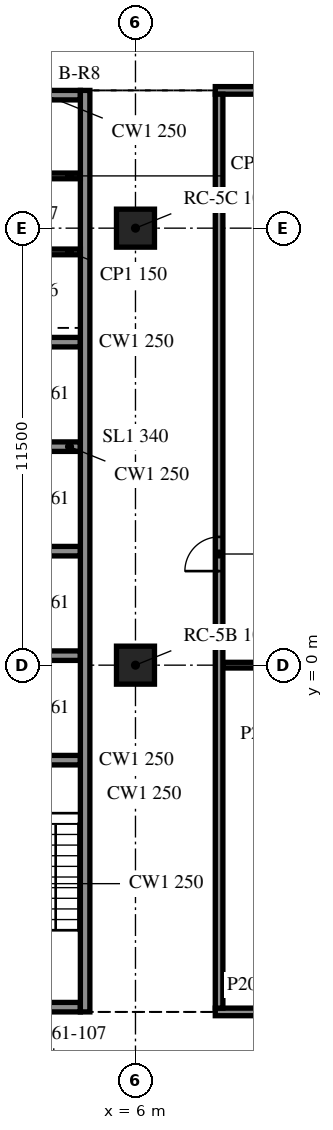
"""IFC4 building model, lengths in metres.
Left out: names, types, materials, properties, quantities, classifications, styles, units other than length and angle.
Written with IfcOpenShell. Run it as: python <this file> out.ifc"""

import sys

from ifc_helpers import new_model, si_unit, direction, frame, frame_2d, origin, origin_2d, place, context, subcontext, project, spatial, rectangle, extrude, element, fill, save


model = new_model("IFC4")
c1 = context("Model", 3, precision=1e-05, world=origin(), true_north=direction((0.0, 1.0)))
c2 = subcontext(c1, "Body", "Model", "MODEL_VIEW")
j1 = project(units=[si_unit("LENGTHUNIT", "METRE"), si_unit("PLANEANGLEUNIT", "RADIAN")], contexts=[c1])
p1 = place(None, origin())
s1 = spatial("IfcSite", under=j1, at=p1, CompositionType="ELEMENT")
p2 = place(p1, origin())
s2 = spatial("IfcBuilding", under=s1, at=p2, CompositionType="ELEMENT")
p3 = place(p2, frame((0.0, 0.0, 251.4)))
s3 = spatial("IfcBuildingStorey", under=s2, at=p3, CompositionType="ELEMENT", Elevation=251.4)
for number, where, z_axis, x_axis in (
    (1, (6.0, 0.0, -0.34), (0.0, 0.0, 1.0), (1.0, 0.0, 0.0)),
    (2, (6.0, 11.5, -0.34), (0.0, 0.0, 1.0), (1.0, 0.0, 0.0)),
):
    element("IfcColumn", number, at=place(p3, frame(where, z_axis=z_axis, x_axis=x_axis)), inside=s3, PredefinedType="COLUMN", context=c2, shape_type="SweptSolid", body=[
        extrude(rectangle(XDim=1.0, YDim=1.0, at=origin_2d()), origin(), (0.0, 0.0, 1.0), 3.8),
    ])
p4 = place(p3, frame((4.675, -9.125, 0.0), z_axis=(0.0, 0.0, 1.0), x_axis=(0.0, 1.0, 0.0)))
e3 = element("IfcWall", 3, at=p4, inside=s3, PredefinedType="SOLIDWALL", context=c2, shape_type="SweptSolid", body=[
    extrude(rectangle(XDim=24.25, YDim=0.25, at=frame_2d((12.125, 0.0))), origin(), (0.0, 0.0, 1.0), 3.46),
])
p5 = place(p3, frame((4.55, -9.0, 0.0), z_axis=(0.0, 0.0, 1.0), x_axis=(-1.0, 0.0, 0.0)))
e4 = element("IfcWall", 4, at=p5, inside=s3, PredefinedType="SOLIDWALL", context=c2, shape_type="SweptSolid", body=[
    extrude(rectangle(XDim=9.1, YDim=0.25, at=frame_2d((4.55, 0.0))), origin(), (0.0, 0.0, 1.0), 3.46),
])
p6 = place(p5, frame((3.65, 0.0, 0.0)))
e5 = element("IfcOpeningElement", 5, at=p6, cuts=e4, PredefinedType="OPENING", context=c2, shape_type="SweptSolid", body=[
    extrude(rectangle(XDim=1.8, YDim=2.1, at=frame_2d((0.9, 1.05))), frame((0.0, 0.135, 0.0), z_axis=(0.0, -1.0, 0.0), x_axis=(1.0, 0.0, 0.0)), (0.0, 0.0, 1.0), 0.27),
])
p7 = place(p3, frame((-4.55, 15.0, 0.0), z_axis=(0.0, 0.0, 1.0), x_axis=(1.0, 0.0, 0.0)))
e6 = element("IfcWall", 6, at=p7, inside=s3, PredefinedType="SOLIDWALL", context=c2, shape_type="SweptSolid", body=[
    extrude(rectangle(XDim=9.1, YDim=0.25, at=frame_2d((4.55, 0.0))), origin(), (0.0, 0.0, 1.0), 3.46),
])
p8 = place(p7, frame((3.65, 0.0, 0.0)))
e7 = element("IfcOpeningElement", 7, at=p8, cuts=e6, PredefinedType="OPENING", context=c2, shape_type="SweptSolid", body=[
    extrude(rectangle(XDim=1.8, YDim=2.1, at=frame_2d((0.9, 1.05))), frame((0.0, 0.135, 0.0), z_axis=(0.0, -1.0, 0.0), x_axis=(1.0, 0.0, 0.0)), (0.0, 0.0, 1.0), 0.27),
])
for number, where, z_axis, x_axis in (
    (8, (1.7, -2.5, 0.0), (0.0, 0.0, 1.0), (1.0, 0.0, 0.0)),
    (9, (1.7, 0.25, 0.0), (0.0, 0.0, 1.0), (1.0, 0.0, 0.0)),
    (10, (1.7, 3.0, 0.0), (0.0, 0.0, 1.0), (1.0, 0.0, 0.0)),
    (11, (1.7, 5.75, 0.0), (0.0, 0.0, 1.0), (1.0, 0.0, 0.0)),
    (12, (1.7, 8.5, 0.0), (0.0, 0.0, 1.0), (1.0, 0.0, 0.0)),
):
    element("IfcWall", number, at=place(p3, frame(where, z_axis=z_axis, x_axis=x_axis)), inside=s3, PredefinedType="SOLIDWALL", context=c2, shape_type="SweptSolid", body=[
        extrude(rectangle(XDim=2.85, YDim=0.25, at=frame_2d((1.425, 0.0))), origin(), (0.0, 0.0, 1.0), 3.46),
    ])
for number, where, z_axis, x_axis in (
    (13, (1.7, 10.875, 0.0), (0.0, 0.0, 1.0), (1.0, 0.0, 0.0)),
    (14, (1.7, 12.875, 0.0), (0.0, 0.0, 1.0), (1.0, 0.0, 0.0)),
):
    element("IfcWall", number, at=place(p3, frame(where, z_axis=z_axis, x_axis=x_axis)), inside=s3, PredefinedType="PARTITIONING", context=c2, shape_type="SweptSolid", body=[
        extrude(rectangle(XDim=2.85, YDim=0.15, at=frame_2d((1.425, 0.0))), origin(), (0.0, 0.0, 1.0), 3.46),
    ])
p9 = place(p3, frame((8.1, -9.125, 0.0), z_axis=(0.0, 0.0, 1.0), x_axis=(1.0, 0.0, 0.0)))
e15 = element("IfcWall", 15, at=p9, inside=s3, PredefinedType="PARTITIONING", context=c2, shape_type="SweptSolid", body=[
    extrude(rectangle(XDim=7.7, YDim=0.2, at=frame_2d((3.85, 0.0))), origin(), (0.0, 0.0, 1.0), 3.46),
])
p10 = place(p9, frame((3.3, 0.0, 0.0)))
e16 = element("IfcOpeningElement", 16, at=p10, cuts=e15, PredefinedType="OPENING", context=c2, shape_type="SweptSolid", body=[
    extrude(rectangle(XDim=0.9, YDim=2.1, at=frame_2d((0.45, 1.05))), frame((0.0, 0.11, 0.0), z_axis=(0.0, -1.0, 0.0), x_axis=(1.0, 0.0, 0.0)), (0.0, 0.0, 1.0), 0.22),
])
p11 = place(p3, frame((8.3, 0.0, 0.0), z_axis=(0.0, 0.0, 1.0), x_axis=(1.0, 0.0, 0.0)))
e17 = element("IfcWall", 17, at=p11, inside=s3, PredefinedType="PARTITIONING", context=c2, shape_type="SweptSolid", body=[
    extrude(rectangle(XDim=7.3, YDim=0.15, at=frame_2d((3.65, 0.0))), origin(), (0.0, 0.0, 1.0), 3.46),
])
p12 = place(p3, frame((8.1, 15.125, 0.0), z_axis=(0.0, 0.0, 1.0), x_axis=(1.0, 0.0, 0.0)))
e18 = element("IfcWall", 18, at=p12, inside=s3, PredefinedType="PARTITIONING", context=c2, shape_type="SweptSolid", body=[
    extrude(rectangle(XDim=7.7, YDim=0.2, at=frame_2d((3.85, 0.0))), origin(), (0.0, 0.0, 1.0), 3.46),
])
p13 = place(p3, frame((8.2, -9.025, 0.0), z_axis=(0.0, 0.0, 1.0), x_axis=(0.0, 1.0, 0.0)))
e19 = element("IfcWall", 19, at=p13, inside=s3, PredefinedType="PARTITIONING", context=c2, shape_type="SweptSolid", body=[
    extrude(rectangle(XDim=24.05, YDim=0.2, at=frame_2d((12.025, 0.0))), origin(), (0.0, 0.0, 1.0), 3.46),
])
p14 = place(p13, frame((11.5, 0.0, 0.0)))
e20 = element("IfcOpeningElement", 20, at=p14, cuts=e19, PredefinedType="OPENING", context=c2, shape_type="SweptSolid", body=[
    extrude(rectangle(XDim=0.9, YDim=2.1, at=frame_2d((0.45, 1.05))), frame((0.0, 0.11, 0.0), z_axis=(0.0, -1.0, 0.0), x_axis=(1.0, 0.0, 0.0)), (0.0, 0.0, 1.0), 0.22),
])
p15 = place(p14, origin())
e21 = element("IfcDoor", 21, at=p15, inside=s3, OperationType="SINGLE_SWING_RIGHT", PredefinedType="DOOR", context=c2, shape_type="SweptSolid", body=[
    extrude(rectangle(XDim=0.9, YDim=2.1, at=frame_2d((0.45, 1.05))), frame((0.0, 0.025, 0.0), z_axis=(0.0, -1.0, 0.0), x_axis=(1.0, 0.0, 0.0)), (0.0, 0.0, 1.0), 0.05),
])
fill(e20, e21)
save(model, sys.argv[1])
